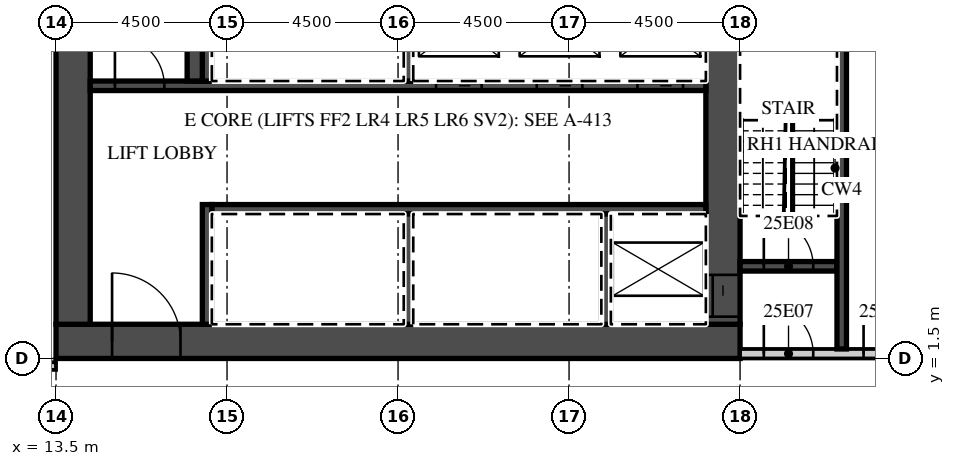
"""IFC4 building model, lengths in metres.
Left out: names, types, materials, properties, quantities, classifications, styles, units other than length and angle.
Written with IfcOpenShell. Run it as: python <this file> out.ifc"""

import sys

from ifc_helpers import new_model, si_unit, direction, frame, frame_2d, origin, place, context, subcontext, project, spatial, rectangle, extrude, element, fill, save


model = new_model("IFC4")
c1 = context("Model", 3, precision=1e-05, world=origin(), true_north=direction((0.0, 1.0)))
c2 = subcontext(c1, "Body", "Model", "MODEL_VIEW")
j1 = project(units=[si_unit("LENGTHUNIT", "METRE"), si_unit("PLANEANGLEUNIT", "RADIAN")], contexts=[c1])
p1 = place(None, origin())
s1 = spatial("IfcSite", under=j1, at=p1, CompositionType="ELEMENT")
p2 = place(p1, origin())
s2 = spatial("IfcBuilding", under=s1, at=p2, CompositionType="ELEMENT")
p3 = place(p2, frame((0.0, 0.0, 117.4)))
s3 = spatial("IfcBuildingStorey", under=s2, at=p3, CompositionType="ELEMENT", Elevation=117.4)
p4 = place(p3, frame((-39.316, 1.3, 0.0), z_axis=(0.0, 0.0, 1.0), x_axis=(1.0, 0.0, 0.0)))
e1 = element("IfcWall", 1, at=p4, inside=s3, PredefinedType="PARTITIONING", context=c2, shape_type="SweptSolid", body=[
    extrude(rectangle(XDim=52.816, YDim=0.2, at=frame_2d((26.408, 0.0))), origin(), (0.0, 0.0, 1.0), 3.02),
])
p5 = place(p4, frame((0.15, 0.0, 0.0)))
e2 = element("IfcOpeningElement", 2, at=p5, cuts=e1, PredefinedType="OPENING", context=c2, shape_type="SweptSolid", body=[
    extrude(rectangle(XDim=0.9, YDim=2.1, at=frame_2d((0.45, 1.05))), frame((0.0, 0.11, 0.0), z_axis=(0.0, -1.0, 0.0), x_axis=(1.0, 0.0, 0.0)), (0.0, 0.0, 1.0), 0.22),
])
p6 = place(p4, frame((6.266, 0.0, 0.0)))
e3 = element("IfcOpeningElement", 3, at=p6, cuts=e1, PredefinedType="OPENING", context=c2, shape_type="SweptSolid", body=[
    extrude(rectangle(XDim=1.0, YDim=2.1, at=frame_2d((0.5, 1.05))), frame((0.0, 0.11, 0.0), z_axis=(0.0, -1.0, 0.0), x_axis=(1.0, 0.0, 0.0)), (0.0, 0.0, 1.0), 0.22),
])
p7 = place(p4, frame((10.741, 0.0, 0.0)))
e4 = element("IfcOpeningElement", 4, at=p7, cuts=e1, PredefinedType="OPENING", context=c2, shape_type="SweptSolid", body=[
    extrude(rectangle(XDim=1.0, YDim=2.1, at=frame_2d((0.5, 1.05))), frame((0.0, 0.11, 0.0), z_axis=(0.0, -1.0, 0.0), x_axis=(1.0, 0.0, 0.0)), (0.0, 0.0, 1.0), 0.22),
])
p8 = place(p4, frame((17.678, 0.0, 0.0)))
e5 = element("IfcOpeningElement", 5, at=p8, cuts=e1, PredefinedType="OPENING", context=c2, shape_type="SweptSolid", body=[
    extrude(rectangle(XDim=1.2, YDim=2.1, at=frame_2d((0.6, 1.05))), frame((0.0, 0.11, 0.0), z_axis=(0.0, -1.0, 0.0), x_axis=(1.0, 0.0, 0.0)), (0.0, 0.0, 1.0), 0.22),
])
p9 = place(p4, frame((26.678, 0.0, 0.0)))
e6 = element("IfcOpeningElement", 6, at=p9, cuts=e1, PredefinedType="OPENING", context=c2, shape_type="SweptSolid", body=[
    extrude(rectangle(XDim=1.2, YDim=2.1, at=frame_2d((0.6, 1.05))), frame((0.0, 0.11, 0.0), z_axis=(0.0, -1.0, 0.0), x_axis=(1.0, 0.0, 0.0)), (0.0, 0.0, 1.0), 0.22),
])
p10 = place(p4, frame((35.678, 0.0, 0.0)))
e7 = element("IfcOpeningElement", 7, at=p10, cuts=e1, PredefinedType="OPENING", context=c2, shape_type="SweptSolid", body=[
    extrude(rectangle(XDim=1.2, YDim=2.1, at=frame_2d((0.6, 1.05))), frame((0.0, 0.11, 0.0), z_axis=(0.0, -1.0, 0.0), x_axis=(1.0, 0.0, 0.0)), (0.0, 0.0, 1.0), 0.22),
])
p11 = place(p4, frame((41.754, 0.0, 0.0)))
e8 = element("IfcOpeningElement", 8, at=p11, cuts=e1, PredefinedType="OPENING", context=c2, shape_type="SweptSolid", body=[
    extrude(rectangle(XDim=1.2, YDim=2.1, at=frame_2d((0.6, 1.05))), frame((0.0, 0.11, 0.0), z_axis=(0.0, -1.0, 0.0), x_axis=(1.0, 0.0, 0.0)), (0.0, 0.0, 1.0), 0.22),
])
p12 = place(p4, frame((51.241, 0.0, 0.0)))
e9 = element("IfcOpeningElement", 9, at=p12, cuts=e1, PredefinedType="OPENING", context=c2, shape_type="SweptSolid", body=[
    extrude(rectangle(XDim=1.0, YDim=2.1, at=frame_2d((0.5, 1.05))), frame((0.0, 0.11, 0.0), z_axis=(0.0, -1.0, 0.0), x_axis=(1.0, 0.0, 0.0)), (0.0, 0.0, 1.0), 0.22),
])
p13 = place(p3, frame((13.5, 1.95, 0.0), z_axis=(0.0, 0.0, 1.0), x_axis=(1.0, 0.0, 0.0)))
e10 = element("IfcWall", 10, at=p13, inside=s3, PredefinedType="SHEAR", context=c2, shape_type="SweptSolid", body=[
    extrude(rectangle(XDim=18.0, YDim=0.9, at=frame_2d((9.0, 0.0))), origin(), (0.0, 0.0, 1.0), 3.02),
])
p14 = place(p13, frame((1.475, 0.0, 0.0)))
e11 = element("IfcOpeningElement", 11, at=p14, cuts=e10, PredefinedType="OPENING", context=c2, shape_type="SweptSolid", body=[
    extrude(rectangle(XDim=1.8, YDim=2.1, at=frame_2d((0.9, 1.05))), frame((0.0, 0.46, 0.0), z_axis=(0.0, -1.0, 0.0), x_axis=(1.0, 0.0, 0.0)), (0.0, 0.0, 1.0), 0.92),
])
p15 = place(p3, frame((31.05, 2.4, 0.0), z_axis=(0.0, 0.0, 1.0), x_axis=(0.0, 1.0, 0.0)))
e12 = element("IfcWall", 12, at=p15, inside=s3, PredefinedType="SHEAR", context=c2, shape_type="SweptSolid", body=[
    extrude(rectangle(XDim=12.8, YDim=0.9, at=frame_2d((6.4, 0.0))), origin(), (0.0, 0.0, 1.0), 3.02),
])
p16 = place(p15, frame((0.2, 0.0, 0.0)))
e13 = element("IfcOpeningElement", 13, at=p16, cuts=e12, PredefinedType="OPENING", context=c2, shape_type="SweptSolid", body=[
    extrude(rectangle(XDim=1.1, YDim=2.1, at=frame_2d((0.55, 1.05))), frame((0.0, 0.46, 0.0), z_axis=(0.0, -1.0, 0.0), x_axis=(1.0, 0.0, 0.0)), (0.0, 0.0, 1.0), 0.92),
])
p17 = place(p3, frame((13.95, 2.4, 0.0), z_axis=(0.0, 0.0, 1.0), x_axis=(0.0, 1.0, 0.0)))
e14 = element("IfcWall", 14, at=p17, inside=s3, PredefinedType="SHEAR", context=c2, shape_type="SweptSolid", body=[
    extrude(rectangle(XDim=12.2, YDim=0.9, at=frame_2d((6.1, 0.0))), origin(), (0.0, 0.0, 1.0), 3.02),
])
p18 = place(p3, frame((17.6, 5.425, 0.0), z_axis=(0.0, 0.0, 1.0), x_axis=(1.0, 0.0, 0.0)))
e15 = element("IfcWall", 15, at=p18, inside=s3, PredefinedType="SHEAR", context=c2, shape_type="SweptSolid", body=[
    extrude(rectangle(XDim=13.0, YDim=0.25, at=frame_2d((6.5, 0.0))), origin(), (0.0, 0.0, 1.0), 3.02),
])
p19 = place(p3, frame((17.475, 2.4, 0.0), z_axis=(0.0, 0.0, 1.0), x_axis=(0.0, 1.0, 0.0)))
e16 = element("IfcWall", 16, at=p19, inside=s3, PredefinedType="SHEAR", context=c2, shape_type="SweptSolid", body=[
    extrude(rectangle(XDim=3.15, YDim=0.25, at=frame_2d((1.575, 0.0))), origin(), (0.0, 0.0, 1.0), 3.02),
])
for number, where, z_axis, x_axis in (
    (17, (27.975, 2.4, 0.0), (0.0, 0.0, 1.0), (0.0, 1.0, 0.0)),
    (18, (22.775, 2.4, 0.0), (0.0, 0.0, 1.0), (0.0, 1.0, 0.0)),
):
    element("IfcWall", number, at=place(p3, frame(where, z_axis=z_axis, x_axis=x_axis)), inside=s3, PredefinedType="SHEAR", context=c2, shape_type="SweptSolid", body=[
        extrude(rectangle(XDim=2.9, YDim=0.25, at=frame_2d((1.45, 0.0))), origin(), (0.0, 0.0, 1.0), 3.02),
    ])
p20 = place(p3, frame((14.4, 8.675, 0.0), z_axis=(0.0, 0.0, 1.0), x_axis=(1.0, 0.0, 0.0)))
e19 = element("IfcWall", 19, at=p20, inside=s3, PredefinedType="SHEAR", context=c2, shape_type="SweptSolid", body=[
    extrude(rectangle(XDim=16.2, YDim=0.25, at=frame_2d((8.1, 0.0))), origin(), (0.0, 0.0, 1.0), 3.02),
])
p21 = place(p20, frame((14.4, 0.0, 0.0)))
e20 = element("IfcOpeningElement", 20, at=p21, cuts=e19, PredefinedType="OPENING", context=c2, shape_type="SweptSolid", body=[
    extrude(rectangle(XDim=1.2, YDim=2.1, at=frame_2d((0.6, 1.05))), frame((0.0, 0.135, 0.0), z_axis=(0.0, -1.0, 0.0), x_axis=(1.0, 0.0, 0.0)), (0.0, 0.0, 1.0), 0.27),
])
p22 = place(p20, frame((11.75, 0.0, 0.0)))
e21 = element("IfcOpeningElement", 21, at=p22, cuts=e19, PredefinedType="OPENING", context=c2, shape_type="SweptSolid", body=[
    extrude(rectangle(XDim=1.2, YDim=2.1, at=frame_2d((0.6, 1.05))), frame((0.0, 0.135, 0.0), z_axis=(0.0, -1.0, 0.0), x_axis=(1.0, 0.0, 0.0)), (0.0, 0.0, 1.0), 0.27),
])
p23 = place(p20, frame((9.1, 0.0, 0.0)))
e22 = element("IfcOpeningElement", 22, at=p23, cuts=e19, PredefinedType="OPENING", context=c2, shape_type="SweptSolid", body=[
    extrude(rectangle(XDim=1.2, YDim=2.1, at=frame_2d((0.6, 1.05))), frame((0.0, 0.135, 0.0), z_axis=(0.0, -1.0, 0.0), x_axis=(1.0, 0.0, 0.0)), (0.0, 0.0, 1.0), 0.27),
])
p24 = place(p20, frame((0.65, 0.0, 0.0)))
e23 = element("IfcOpeningElement", 23, at=p24, cuts=e19, PredefinedType="OPENING", context=c2, shape_type="SweptSolid", body=[
    extrude(rectangle(XDim=1.3, YDim=2.1, at=frame_2d((0.65, 1.05))), frame((0.0, 0.135, 0.0), z_axis=(0.0, -1.0, 0.0), x_axis=(1.0, 0.0, 0.0)), (0.0, 0.0, 1.0), 0.27),
])
for number, where, z_axis, x_axis in (
    (24, (17.475, 8.8, 0.0), (0.0, 0.0, 1.0), (0.0, 1.0, 0.0)),
    (25, (22.775, 8.8, 0.0), (0.0, 0.0, 1.0), (0.0, 1.0, 0.0)),
):
    element("IfcWall", number, at=place(p3, frame(where, z_axis=z_axis, x_axis=x_axis)), inside=s3, PredefinedType="SHEAR", context=c2, shape_type="SweptSolid", body=[
        extrude(rectangle(XDim=2.9, YDim=0.25, at=frame_2d((1.45, 0.0))), origin(), (0.0, 0.0, 1.0), 3.02),
    ])
p25 = place(p3, frame((17.15, 8.8, 0.0), z_axis=(0.0, 0.0, 1.0), x_axis=(0.0, 1.0, 0.0)))
e26 = element("IfcWall", 26, at=p25, inside=s3, PredefinedType="SHEAR", context=c2, shape_type="SweptSolid", body=[
    extrude(rectangle(XDim=5.8, YDim=0.4, at=frame_2d((2.9, 0.0))), origin(), (0.0, 0.0, 1.0), 3.02),
])
p26 = place(p3, frame((31.5, 1.625, 0.0), z_axis=(0.0, 0.0, 1.0), x_axis=(1.0, 0.0, 0.0)))
e27 = element("IfcWall", 27, at=p26, inside=s3, PredefinedType="PARTITIONING", context=c2, shape_type="SweptSolid", body=[
    extrude(rectangle(XDim=15.65, YDim=0.25, at=frame_2d((7.825, 0.0))), origin(), (0.0, 0.0, 1.0), 3.02),
])
p27 = place(p26, frame((0.625, 0.0, 0.0)))
e28 = element("IfcOpeningElement", 28, at=p27, cuts=e27, PredefinedType="OPENING", context=c2, shape_type="SweptSolid", body=[
    extrude(rectangle(XDim=1.3, YDim=2.1, at=frame_2d((0.65, 1.05))), frame((0.0, 0.135, 0.0), z_axis=(0.0, -1.0, 0.0), x_axis=(1.0, 0.0, 0.0)), (0.0, 0.0, 1.0), 0.27),
])
p28 = place(p26, frame((3.25, 0.0, 0.0)))
e29 = element("IfcOpeningElement", 29, at=p28, cuts=e27, PredefinedType="OPENING", context=c2, shape_type="SweptSolid", body=[
    extrude(rectangle(XDim=1.1, YDim=2.1, at=frame_2d((0.55, 1.05))), frame((0.0, 0.135, 0.0), z_axis=(0.0, -1.0, 0.0), x_axis=(1.0, 0.0, 0.0)), (0.0, 0.0, 1.0), 0.27),
])
p29 = place(p3, frame((31.5, 3.925, 0.0), z_axis=(0.0, 0.0, 1.0), x_axis=(1.0, 0.0, 0.0)))
e30 = element("IfcWall", 30, at=p29, inside=s3, PredefinedType="SHEAR", context=c2, shape_type="SweptSolid", body=[
    extrude(rectangle(XDim=2.55, YDim=0.25, at=frame_2d((1.275, 0.0))), origin(), (0.0, 0.0, 1.0), 3.02),
])
p30 = place(p29, frame((0.625, 0.0, 0.0)))
e31 = element("IfcOpeningElement", 31, at=p30, cuts=e30, PredefinedType="OPENING", context=c2, shape_type="SweptSolid", body=[
    extrude(rectangle(XDim=1.3, YDim=2.1, at=frame_2d((0.65, 1.05))), frame((0.0, 0.135, 0.0), z_axis=(0.0, -1.0, 0.0), x_axis=(1.0, 0.0, 0.0)), (0.0, 0.0, 1.0), 0.27),
])
p31 = place(p3, frame((34.175, 1.75, 0.0), z_axis=(0.0, 0.0, 1.0), x_axis=(0.0, 1.0, 0.0)))
e32 = element("IfcWall", 32, at=p31, inside=s3, PredefinedType="SHEAR", context=c2, shape_type="SweptSolid", body=[
    extrude(rectangle(XDim=8.35, YDim=0.25, at=frame_2d((4.175, 0.0))), origin(), (0.0, 0.0, 1.0), 3.02),
])
p32 = place(p21, origin())
e33 = element("IfcDoor", 33, at=p32, inside=s3, OperationType="SLIDING_TO_LEFT", PredefinedType="DOOR", context=c2, shape_type="SweptSolid", body=[
    extrude(rectangle(XDim=1.2, YDim=2.1, at=frame_2d((0.6, 1.05))), frame((0.0, 0.025, 0.0), z_axis=(0.0, -1.0, 0.0), x_axis=(1.0, 0.0, 0.0)), (0.0, 0.0, 1.0), 0.05),
])
fill(e20, e33)
p33 = place(p22, origin())
e34 = element("IfcDoor", 34, at=p33, inside=s3, OperationType="SLIDING_TO_RIGHT", PredefinedType="DOOR", context=c2, shape_type="SweptSolid", body=[
    extrude(rectangle(XDim=1.2, YDim=2.1, at=frame_2d((0.6, 1.05))), frame((0.0, 0.025, 0.0), z_axis=(0.0, -1.0, 0.0), x_axis=(1.0, 0.0, 0.0)), (0.0, 0.0, 1.0), 0.05),
])
fill(e21, e34)
p34 = place(p23, origin())
e35 = element("IfcDoor", 35, at=p34, inside=s3, OperationType="SLIDING_TO_RIGHT", PredefinedType="DOOR", context=c2, shape_type="SweptSolid", body=[
    extrude(rectangle(XDim=1.2, YDim=2.1, at=frame_2d((0.6, 1.05))), frame((0.0, 0.025, 0.0), z_axis=(0.0, -1.0, 0.0), x_axis=(1.0, 0.0, 0.0)), (0.0, 0.0, 1.0), 0.05),
])
fill(e22, e35)
p35 = place(p16, origin())
e36 = element("IfcDoor", 36, at=p35, inside=s3, OperationType="SLIDING_TO_LEFT", PredefinedType="DOOR", context=c2, shape_type="SweptSolid", body=[
    extrude(rectangle(XDim=1.1, YDim=2.1, at=frame_2d((0.55, 1.05))), frame((0.0, 0.025, 0.0), z_axis=(0.0, -1.0, 0.0), x_axis=(1.0, 0.0, 0.0)), (0.0, 0.0, 1.0), 0.05),
])
fill(e13, e36)
p36 = place(p14, origin())
e37 = element("IfcDoor", 37, at=p36, inside=s3, OperationType="DOUBLE_DOOR_DOUBLE_SWING", PredefinedType="DOOR", context=c2, shape_type="SweptSolid", body=[
    extrude(rectangle(XDim=1.8, YDim=2.1, at=frame_2d((0.9, 1.05))), frame((0.0, 0.025, 0.0), z_axis=(0.0, -1.0, 0.0), x_axis=(1.0, 0.0, 0.0)), (0.0, 0.0, 1.0), 0.05),
])
fill(e11, e37)
p37 = place(p27, origin())
e38 = element("IfcDoor", 38, at=p37, inside=s3, OperationType="SINGLE_SWING_LEFT", PredefinedType="DOOR", context=c2, shape_type="SweptSolid", body=[
    extrude(rectangle(XDim=1.3, YDim=2.1, at=frame_2d((0.65, 1.05))), frame((0.0, 0.025, 0.0), z_axis=(0.0, -1.0, 0.0), x_axis=(1.0, 0.0, 0.0)), (0.0, 0.0, 1.0), 0.05),
])
fill(e28, e38)
p38 = place(p30, origin())
e39 = element("IfcDoor", 39, at=p38, inside=s3, OperationType="SINGLE_SWING_LEFT", PredefinedType="DOOR", context=c2, shape_type="SweptSolid", body=[
    extrude(rectangle(XDim=1.3, YDim=2.1, at=frame_2d((0.65, 1.05))), frame((0.0, 0.025, 0.0), z_axis=(0.0, -1.0, 0.0), x_axis=(1.0, 0.0, 0.0)), (0.0, 0.0, 1.0), 0.05),
])
fill(e31, e39)
p39 = place(p28, origin())
e40 = element("IfcDoor", 40, at=p39, inside=s3, OperationType="SINGLE_SWING_LEFT", PredefinedType="DOOR", context=c2, shape_type="SweptSolid", body=[
    extrude(rectangle(XDim=1.1, YDim=2.1, at=frame_2d((0.55, 1.05))), frame((0.0, 0.025, 0.0), z_axis=(0.0, -1.0, 0.0), x_axis=(1.0, 0.0, 0.0)), (0.0, 0.0, 1.0), 0.05),
])
fill(e29, e40)
p40 = place(p24, origin())
e41 = element("IfcDoor", 41, at=p40, inside=s3, OperationType="SINGLE_SWING_LEFT", PredefinedType="DOOR", context=c2, shape_type="SweptSolid", body=[
    extrude(rectangle(XDim=1.3, YDim=2.1, at=frame_2d((0.65, 1.05))), frame((0.0, 0.025, 0.0), z_axis=(0.0, -1.0, 0.0), x_axis=(1.0, 0.0, 0.0)), (0.0, 0.0, 1.0), 0.05),
])
fill(e23, e41)
save(model, sys.argv[1])
